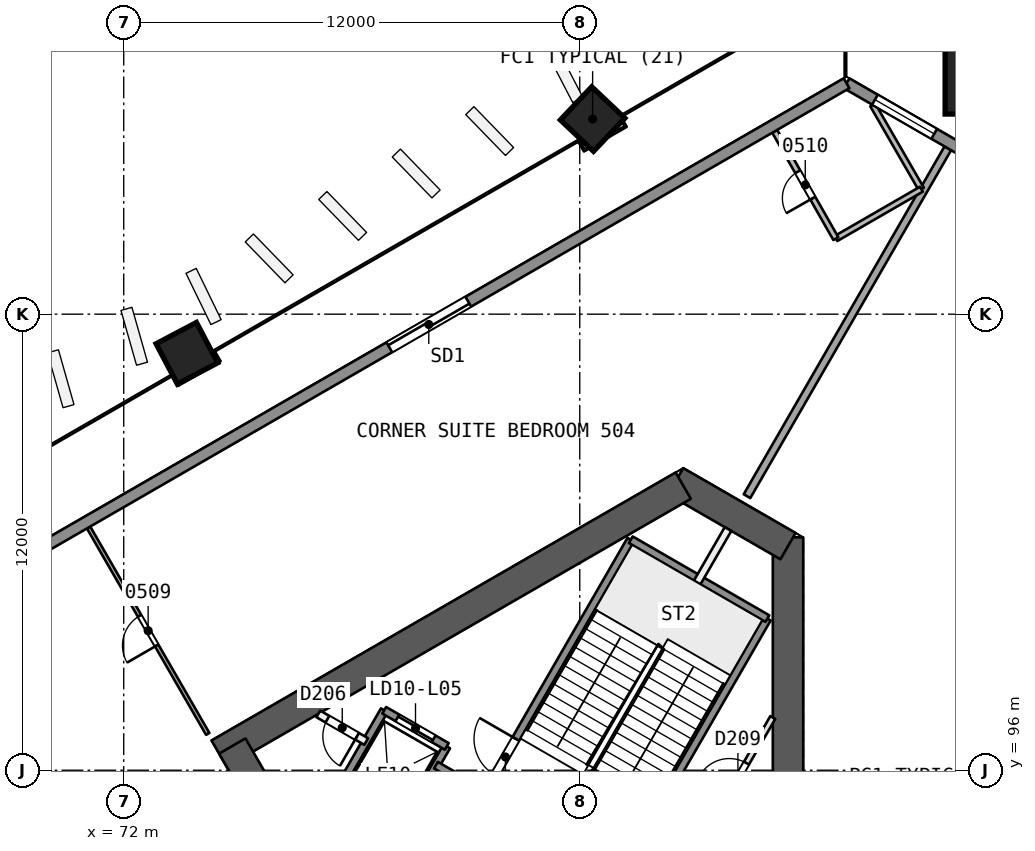
"""IFC4 building model, lengths in metres.
Left out: names, types, materials, properties, quantities, classifications, styles, units other than length and angle.
Written with IfcOpenShell. Run it as: python <this file> out.ifc"""

import sys

from ifc_helpers import new_model, si_unit, direction, frame, frame_2d, origin, origin_2d, place, context, subcontext, project, spatial, rectangle, extrude, element, fill, save


model = new_model("IFC4")
c1 = context("Model", 3, precision=1e-05, world=origin(), true_north=direction((0.0, 1.0)))
c2 = subcontext(c1, "Body", "Model", "MODEL_VIEW")
j1 = project(units=[si_unit("LENGTHUNIT", "METRE"), si_unit("PLANEANGLEUNIT", "RADIAN")], contexts=[c1])
p1 = place(None, origin())
s1 = spatial("IfcSite", under=j1, at=p1, CompositionType="ELEMENT")
p2 = place(p1, origin())
s2 = spatial("IfcBuilding", under=s1, at=p2, CompositionType="ELEMENT")
p3 = place(p2, frame((0.0, 0.0, 30.0)))
s3 = spatial("IfcBuildingStorey", under=s2, at=p3, CompositionType="ELEMENT", Elevation=30.0)
p4 = place(p3, frame((89.48, 88.194, 0.0), z_axis=(0.0, 0.0, 1.0), x_axis=(0.0, 1.0, 0.0)))
e1 = element("IfcWall", 1, at=p4, inside=s3, PredefinedType="SHEAR", context=c2, shape_type="SweptSolid", body=[
    extrude(rectangle(XDim=13.933, YDim=0.8, at=frame_2d((6.967, 0.0))), origin(), (0.0, 0.0, 1.0), 3.7),
])
p5 = place(p3, frame((89.48, 101.897, 0.0), z_axis=(0.0, 0.0, 1.0), x_axis=(-0.866034355626, 0.499984494636, 0.0)))
e2 = element("IfcWall", 2, at=p5, inside=s3, PredefinedType="SHEAR", context=c2, shape_type="SweptSolid", body=[
    extrude(rectangle(XDim=3.414, YDim=0.8, at=frame_2d((1.707, 0.0))), origin(), (0.0, 0.0, 1.0), 3.7),
])
p6 = place(p3, frame((86.723, 103.488, 0.0), z_axis=(0.0, 0.0, 1.0), x_axis=(-0.866032504327, -0.499987701298, 0.0)))
e3 = element("IfcWall", 3, at=p6, inside=s3, PredefinedType="SHEAR", context=c2, shape_type="SweptSolid", body=[
    extrude(rectangle(XDim=14.102, YDim=0.8, at=frame_2d((7.051, 0.0))), origin(), (0.0, 0.0, 1.0), 3.7),
])
p7 = place(p3, frame((74.856, 96.637, 0.0), z_axis=(0.0, 0.0, 1.0), x_axis=(0.499993500917, -0.866029155999, 0.0)))
e4 = element("IfcWall", 4, at=p7, inside=s3, PredefinedType="SHEAR", context=c2, shape_type="SweptSolid", body=[
    extrude(rectangle(XDim=9.98, YDim=0.8, at=frame_2d((4.99, 0.0))), origin(), (0.0, 0.0, 1.0), 3.7),
])
p8 = place(p7, frame((7.83, 0.0, 0.0)))
e5 = element("IfcOpeningElement", 5, at=p8, cuts=e4, PredefinedType="OPENING", context=c2, shape_type="SweptSolid", body=[
    extrude(rectangle(XDim=1.2, YDim=2.1, at=frame_2d((0.6, 1.05))), frame((0.0, 0.411, 0.0), z_axis=(0.0, -1.0, 0.0), x_axis=(1.0, 0.0, 0.0)), (0.0, 0.0, 1.0), 0.821),
])
p9 = place(p3, frame((95.035, 114.702, 0.0), z_axis=(-0.017607037296, -0.030466109479, 0.999380712447), x_axis=(0.500064653071, 0.865272876704, 0.035187946645)))
e6 = element("IfcColumn", 6, at=p9, inside=s3, PredefinedType="COLUMN", context=c2, shape_type="SweptSolid", body=[
    extrude(rectangle(XDim=2.8, YDim=2.8, at=origin_2d()), origin(), (0.0, 0.0, 1.0), 3.702),
])
p10 = place(p3, frame((84.349, 113.168, 0.0), z_axis=(-0.008376454378, -0.028163354484, 0.999568237028), x_axis=(0.865850871468, 0.499846877556, 0.02133933866)))
e7 = element("IfcColumn", 7, at=p10, inside=s3, PredefinedType="COLUMN", context=c2, shape_type="SweptSolid", body=[
    extrude(rectangle(XDim=1.2, YDim=1.2, at=origin_2d()), origin(), (0.0, 0.0, 1.0), 3.702),
])
p11 = place(p3, frame((73.662, 106.998, 0.0), z_axis=(0.000857578916, -0.022824792675, 0.999739112668), x_axis=(0.866060219769, 0.499825848733, 0.01066848966)))
e8 = element("IfcColumn", 8, at=p11, inside=s3, PredefinedType="COLUMN", context=c2, shape_type="SweptSolid", body=[
    extrude(rectangle(XDim=1.2, YDim=1.2, at=origin_2d()), origin(), (0.0, 0.0, 1.0), 3.701),
])
p12 = place(p3, frame((93.686, 112.365, 0.0), z_axis=(0.0, 0.0, 1.0), x_axis=(-0.499997037832, -0.866027113986, 0.0)))
e9 = element("IfcWall", 9, at=p12, inside=s3, PredefinedType="PARTITIONING", context=c2, shape_type="SweptSolid", body=[
    extrude(rectangle(XDim=10.57, YDim=0.2, at=frame_2d((5.285, 0.0))), origin(), (0.0, 0.0, 1.0), 3.2),
])
p13 = place(p3, frame((74.21, 96.956, 0.0), z_axis=(0.0, 0.0, 1.0), x_axis=(-0.499986391729, 0.866033260381, 0.0)))
e10 = element("IfcWall", 10, at=p13, inside=s3, PredefinedType="PARTITIONING", context=c2, shape_type="SweptSolid", body=[
    extrude(rectangle(XDim=6.272, YDim=0.1, at=frame_2d((3.136, 0.0))), origin(), (0.0, 0.0, 1.0), 3.2),
])
p14 = place(p13, frame((2.686, 0.0, 0.0)))
e11 = element("IfcOpeningElement", 11, at=p14, cuts=e10, PredefinedType="OPENING", context=c2, shape_type="SweptSolid", body=[
    extrude(rectangle(XDim=0.9, YDim=2.1, at=frame_2d((0.45, 1.05))), frame((0.0, 0.061, 0.0), z_axis=(0.0, -1.0, 0.0), x_axis=(1.0, 0.0, 0.0)), (0.0, 0.0, 1.0), 0.121),
])
p15 = place(p3, frame((66.754, 99.894, 0.0), z_axis=(0.0, 0.0, 1.0), x_axis=(0.499997291418, -0.866026967579, 0.0)))
e12 = element("IfcWall", 12, at=p15, inside=s3, PredefinedType="PARTITIONING", context=c2, shape_type="SweptSolid", body=[
    extrude(rectangle(XDim=14.251, YDim=0.2, at=frame_2d((7.125, 0.0))), origin(), (0.0, 0.0, 1.0), 3.2),
])
p16 = place(p3, frame((91.709, 113.506, 0.0), z_axis=(0.0, 0.0, 1.0), x_axis=(0.500025035936, -0.866010948798, 0.0)))
e13 = element("IfcWall", 13, at=p16, inside=s3, PredefinedType="PARTITIONING", context=c2, shape_type="SweptSolid", body=[
    extrude(rectangle(XDim=2.561, YDim=0.15, at=frame_2d((1.28, 0.0))), origin(), (0.0, 0.0, 1.0), 3.2),
])
p17 = place(p3, frame((92.99, 111.288, 0.0), z_axis=(0.0, 0.0, 1.0), x_axis=(-0.866021400173, -0.500006934395, 0.0)))
e14 = element("IfcWall", 14, at=p17, inside=s3, PredefinedType="PARTITIONING", context=c2, shape_type="SweptSolid", body=[
    extrude(rectangle(XDim=2.6, YDim=0.15, at=frame_2d((1.3, 0.0))), origin(), (0.0, 0.0, 1.0), 3.2),
])
p18 = place(p3, frame((90.738, 109.988, 0.0), z_axis=(0.0, 0.0, 1.0), x_axis=(-0.494941047154, 0.868926556069, 0.0)))
e15 = element("IfcWall", 15, at=p18, inside=s3, PredefinedType="PARTITIONING", context=c2, shape_type="SweptSolid", body=[
    extrude(rectangle(XDim=3.25, YDim=0.15, at=frame_2d((1.625, 0.0))), origin(), (0.0, 0.0, 1.0), 3.2),
])
p19 = place(p18, frame((1.225, 0.0, 0.0)))
e16 = element("IfcOpeningElement", 16, at=p19, cuts=e15, PredefinedType="OPENING", context=c2, shape_type="SweptSolid", body=[
    extrude(rectangle(XDim=0.8, YDim=2.1, at=frame_2d((0.4, 1.05))), frame((0.0, 0.085, 0.0), z_axis=(0.0, -1.0, 0.0), x_axis=(1.0, 0.0, 0.0)), (0.0, 0.0, 1.0), 0.171),
])
p20 = place(p3, frame((91.021, 114.076, 0.0), z_axis=(0.0, 0.0, 1.0), x_axis=(0.866033291922, -0.499986337096, 0.0)))
e17 = element("IfcWall", 17, at=p20, inside=s3, PredefinedType="SOLIDWALL", context=c2, shape_type="SweptSolid", body=[
    extrude(rectangle(XDim=6.327, YDim=0.3, at=frame_2d((3.164, 0.0))), origin(), (0.0, 0.0, 1.0), 3.2),
])
p21 = place(p20, frame((0.863, 0.0, 0.9)))
e18 = element("IfcOpeningElement", 18, at=p21, cuts=e17, PredefinedType="OPENING", context=c2, shape_type="SweptSolid", body=[
    extrude(rectangle(XDim=1.8, YDim=1.5, at=frame_2d((0.9, 0.75))), frame((0.0, 0.161, 0.0), z_axis=(0.0, -1.0, 0.0), x_axis=(1.0, 0.0, 0.0)), (0.0, 0.0, 1.0), 0.321),
])
p22 = place(p20, frame((3.888, 0.0, 0.9)))
e19 = element("IfcOpeningElement", 19, at=p22, cuts=e17, PredefinedType="OPENING", context=c2, shape_type="SweptSolid", body=[
    extrude(rectangle(XDim=1.8, YDim=1.5, at=frame_2d((0.9, 0.75))), frame((0.0, 0.161, 0.0), z_axis=(0.0, -1.0, 0.0), x_axis=(1.0, 0.0, 0.0)), (0.0, 0.0, 1.0), 0.321),
])
p23 = place(p3, frame((37.479, 83.163, 0.0), z_axis=(0.0, 0.0, 1.0), x_axis=(0.866024340432, 0.500001841776, 0.0)))
e20 = element("IfcWall", 20, at=p23, inside=s3, PredefinedType="SOLIDWALL", context=c2, shape_type="SweptSolid", body=[
    extrude(rectangle(XDim=61.824, YDim=0.3, at=frame_2d((30.912, 0.0))), origin(), (0.0, 0.0, 1.0), 3.2),
])
p24 = place(p23, frame((29.556, 0.0, 0.0)))
e21 = element("IfcOpeningElement", 21, at=p24, cuts=e20, PredefinedType="OPENING", context=c2, shape_type="SweptSolid", body=[
    extrude(rectangle(XDim=2.4, YDim=2.4, at=frame_2d((1.2, 1.2))), frame((0.0, 0.161, 0.0), z_axis=(0.0, -1.0, 0.0), x_axis=(1.0, 0.0, 0.0)), (0.0, 0.0, 1.0), 0.321),
])
p25 = place(p23, frame((35.012, 0.0, 0.0)))
e22 = element("IfcOpeningElement", 22, at=p25, cuts=e20, PredefinedType="OPENING", context=c2, shape_type="SweptSolid", body=[
    extrude(rectangle(XDim=2.4, YDim=2.4, at=frame_2d((1.2, 1.2))), frame((0.0, 0.161, 0.0), z_axis=(0.0, -1.0, 0.0), x_axis=(1.0, 0.0, 0.0)), (0.0, 0.0, 1.0), 0.321),
])
p26 = place(p23, frame((47.93, 0.0, 0.0)))
e23 = element("IfcOpeningElement", 23, at=p26, cuts=e20, PredefinedType="OPENING", context=c2, shape_type="SweptSolid", body=[
    extrude(rectangle(XDim=2.4, YDim=2.4, at=frame_2d((1.2, 1.2))), frame((0.0, 0.161, 0.0), z_axis=(0.0, -1.0, 0.0), x_axis=(1.0, 0.0, 0.0)), (0.0, 0.0, 1.0), 0.321),
])
p27 = place(p23, frame((24.256, 0.0, 0.0)))
e24 = element("IfcOpeningElement", 24, at=p27, cuts=e20, PredefinedType="OPENING", context=c2, shape_type="SweptSolid", body=[
    extrude(rectangle(XDim=2.4, YDim=2.4, at=frame_2d((1.2, 1.2))), frame((0.0, 0.161, 0.0), z_axis=(0.0, -1.0, 0.0), x_axis=(1.0, 0.0, 0.0)), (0.0, 0.0, 1.0), 0.321),
])
p28 = place(p23, frame((11.509, 0.0, 0.0)))
e25 = element("IfcOpeningElement", 25, at=p28, cuts=e20, PredefinedType="OPENING", context=c2, shape_type="SweptSolid", body=[
    extrude(rectangle(XDim=2.4, YDim=2.4, at=frame_2d((1.2, 1.2))), frame((0.0, 0.161, 0.0), z_axis=(0.0, -1.0, 0.0), x_axis=(1.0, 0.0, 0.0)), (0.0, 0.0, 1.0), 0.321),
])
p29 = place(p3, frame((87.271, 94.254, 0.0), z_axis=(0.0, 0.0, 1.0), x_axis=(0.500043727655, 0.866000156139, 0.0)))
e26 = element("IfcWall", 26, at=p29, inside=s3, PredefinedType="PARTITIONING", context=c2, shape_type="SweptSolid", body=[
    extrude(rectangle(XDim=3.618, YDim=0.15, at=frame_2d((1.809, 0.0))), origin(), (0.0, 0.0, 1.0), 3.2),
])
p30 = place(p29, frame((1.332, 0.0, 0.0)))
e27 = element("IfcOpeningElement", 27, at=p30, cuts=e26, PredefinedType="OPENING", context=c2, shape_type="SweptSolid", body=[
    extrude(rectangle(XDim=0.9, YDim=2.1, at=frame_2d((0.45, 1.05))), frame((0.0, 0.085, 0.0), z_axis=(0.0, -1.0, 0.0), x_axis=(1.0, 0.0, 0.0)), (0.0, 0.0, 1.0), 0.171),
])
p31 = place(p3, frame((85.087, 93.321, 0.0), z_axis=(0.0, 0.0, 1.0), x_axis=(0.500019787375, 0.866013979237, 0.0)))
e28 = element("IfcWall", 28, at=p31, inside=s3, PredefinedType="SOLIDWALL", context=c2, shape_type="SweptSolid", body=[
    extrude(rectangle(XDim=7.7, YDim=0.2, at=frame_2d((3.85, 0.0))), origin(), (0.0, 0.0, 1.0), 3.2),
])
p32 = place(p3, frame((87.09, 100.94, 0.0), z_axis=(0.0, 0.0, 1.0), x_axis=(0.499956811548, 0.866050337213, 0.0)))
e29 = element("IfcWall", 29, at=p32, inside=s3, PredefinedType="PARTITIONING", context=c2, shape_type="SweptSolid", body=[
    extrude(rectangle(XDim=1.623, YDim=0.2, at=frame_2d((0.812, 0.0))), origin(), (0.0, 0.0, 1.0), 3.2),
])
p33 = place(p3, frame((81.493, 95.396, 0.0), z_axis=(0.0, 0.0, 1.0), x_axis=(0.500006057782, 0.866021906294, 0.0)))
e30 = element("IfcWall", 30, at=p33, inside=s3, PredefinedType="SOLIDWALL", context=c2, shape_type="SweptSolid", body=[
    extrude(rectangle(XDim=7.7, YDim=0.2, at=frame_2d((3.85, 0.0))), origin(), (0.0, 0.0, 1.0), 3.2),
])
p34 = place(p33, frame((0.55, 0.0, 0.0)))
e31 = element("IfcOpeningElement", 31, at=p34, cuts=e30, PredefinedType="OPENING", context=c2, shape_type="SweptSolid", body=[
    extrude(rectangle(XDim=1.1, YDim=2.1, at=frame_2d((0.55, 1.05))), frame((0.0, 0.11, 0.0), z_axis=(0.0, -1.0, 0.0), x_axis=(1.0, 0.0, 0.0)), (0.0, 0.0, 1.0), 0.221),
])
for number, where, z_axis, x_axis in (
    (32, (78.976, 93.986, 0.0), (0.0, 0.0, 1.0), (0.5, 0.866, 0.0)),
    (33, (77.33, 94.936, 0.0), (0.0, 0.0, 1.0), (0.5, 0.866, 0.0)),
):
    element("IfcWall", number, at=place(p3, frame(where, z_axis=z_axis, x_axis=x_axis)), inside=s3, PredefinedType="SOLIDWALL", context=c2, shape_type="SweptSolid", body=[
        extrude(rectangle(XDim=3.05, YDim=0.2, at=frame_2d((1.525, 0.0))), origin(), (0.0, 0.0, 1.0), 3.2),
    ])
p35 = place(p3, frame((78.38, 96.755, 0.0), z_axis=(0.0, 0.0, 1.0), x_axis=(-0.866003949776, 0.500037157592, 0.0)))
e34 = element("IfcWall", 34, at=p35, inside=s3, PredefinedType="PARTITIONING", context=c2, shape_type="SweptSolid", body=[
    extrude(rectangle(XDim=1.455, YDim=0.2, at=frame_2d((0.728, 0.0))), origin(), (0.0, 0.0, 1.0), 3.2),
])
p36 = place(p35, frame((0.278, 0.0, 0.0)))
e35 = element("IfcOpeningElement", 35, at=p36, cuts=e34, PredefinedType="OPENING", context=c2, shape_type="SweptSolid", body=[
    extrude(rectangle(XDim=0.9, YDim=2.1, at=frame_2d((0.45, 1.05))), frame((0.0, 0.11, 0.0), z_axis=(0.0, -1.0, 0.0), x_axis=(1.0, 0.0, 0.0)), (0.0, 0.0, 1.0), 0.221),
])
p37 = place(p3, frame((88.01, 91.634, 0.0), z_axis=(0.0, 0.0, 1.0), x_axis=(-0.866024315419, 0.5000018851, 0.0)))
e36 = element("IfcWall", 36, at=p37, inside=s3, PredefinedType="SOLIDWALL", context=c2, shape_type="SweptSolid", body=[
    extrude(rectangle(XDim=9.0, YDim=0.2, at=frame_2d((4.5, 0.0))), origin(), (0.0, 0.0, 1.0), 3.2),
])
p38 = place(p3, frame((80.5, 96.627, 0.0), z_axis=(0.0, 0.0, 1.0), x_axis=(-0.86601224135, 0.500022797313, 0.0)))
e37 = element("IfcWall", 37, at=p38, inside=s3, PredefinedType="SOLIDWALL", context=c2, shape_type="SweptSolid", body=[
    extrude(rectangle(XDim=1.9, YDim=0.2, at=frame_2d((0.95, 0.0))), origin(), (0.0, 0.0, 1.0), 3.2),
])
p39 = place(p38, frame((0.4, 0.0, 0.0)))
e38 = element("IfcOpeningElement", 38, at=p39, cuts=e37, PredefinedType="OPENING", context=c2, shape_type="SweptSolid", body=[
    extrude(rectangle(XDim=1.1, YDim=2.1, at=frame_2d((0.55, 1.05))), frame((0.0, 0.11, 0.0), z_axis=(0.0, -1.0, 0.0), x_axis=(1.0, 0.0, 0.0)), (0.0, 0.0, 1.0), 0.221),
])
p40 = place(p3, frame((88.937, 99.99, 0.0), z_axis=(0.0, 0.0, 1.0), x_axis=(-0.866004344652, 0.500036473714, 0.0)))
e39 = element("IfcWall", 39, at=p40, inside=s3, PredefinedType="SOLIDWALL", context=c2, shape_type="SweptSolid", body=[
    extrude(rectangle(XDim=4.15, YDim=0.2, at=frame_2d((2.075, 0.0))), origin(), (0.0, 0.0, 1.0), 3.2),
])
p41 = place(p14, origin())
e40 = element("IfcDoor", 40, at=p41, inside=s3, OperationType="SINGLE_SWING_LEFT", PredefinedType="NOTDEFINED", context=c2, shape_type="SweptSolid", body=[
    extrude(rectangle(XDim=0.9, YDim=2.1, at=frame_2d((0.45, 1.05))), frame((0.0, 0.025, 0.0), z_axis=(0.0, -1.0, 0.0), x_axis=(1.0, 0.0, 0.0)), (0.0, 0.0, 1.0), 0.05),
])
fill(e11, e40)
p42 = place(p19, origin())
e41 = element("IfcDoor", 41, at=p42, inside=s3, OperationType="SINGLE_SWING_LEFT", PredefinedType="NOTDEFINED", context=c2, shape_type="SweptSolid", body=[
    extrude(rectangle(XDim=0.8, YDim=2.1, at=frame_2d((0.4, 1.05))), frame((0.0, 0.025, 0.0), z_axis=(0.0, -1.0, 0.0), x_axis=(1.0, 0.0, 0.0)), (0.0, 0.0, 1.0), 0.05),
])
fill(e16, e41)
p43 = place(p21, origin())
e42 = element("IfcWindow", 42, at=p43, inside=s3, PartitioningType="SINGLE_PANEL", PredefinedType="WINDOW", context=c2, shape_type="SweptSolid", body=[
    extrude(rectangle(XDim=1.8, YDim=1.5, at=frame_2d((0.9, 0.75))), frame((0.0, 0.03, 0.0), z_axis=(0.0, -1.0, 0.0), x_axis=(1.0, 0.0, 0.0)), (0.0, 0.0, 1.0), 0.06),
])
fill(e18, e42)
p44 = place(p26, origin())
e43 = element("IfcDoor", 43, at=p44, inside=s3, OperationType="SLIDING_TO_LEFT", PredefinedType="NOTDEFINED", context=c2, shape_type="SweptSolid", body=[
    extrude(rectangle(XDim=2.4, YDim=2.4, at=frame_2d((1.2, 1.2))), frame((0.0, 0.025, 0.0), z_axis=(0.0, -1.0, 0.0), x_axis=(1.0, 0.0, 0.0)), (0.0, 0.0, 1.0), 0.05),
])
fill(e23, e43)
p45 = place(p39, origin())
e44 = element("IfcDoor", 44, at=p45, inside=s3, OperationType="SLIDING_TO_RIGHT", PredefinedType="NOTDEFINED", context=c2, shape_type="SweptSolid", body=[
    extrude(rectangle(XDim=1.1, YDim=2.1, at=frame_2d((0.55, 1.05))), frame((0.0, 0.025, 0.0), z_axis=(0.0, -1.0, 0.0), x_axis=(1.0, 0.0, 0.0)), (0.0, 0.0, 1.0), 0.05),
])
fill(e38, e44)
p46 = place(p36, origin())
e45 = element("IfcDoor", 45, at=p46, inside=s3, OperationType="SINGLE_SWING_LEFT", PredefinedType="NOTDEFINED", context=c2, shape_type="SweptSolid", body=[
    extrude(rectangle(XDim=0.9, YDim=2.1, at=frame_2d((0.45, 1.05))), frame((0.0, 0.025, 0.0), z_axis=(0.0, -1.0, 0.0), x_axis=(1.0, 0.0, 0.0)), (0.0, 0.0, 1.0), 0.05),
])
fill(e35, e45)
p47 = place(p34, origin())
e46 = element("IfcDoor", 46, at=p47, inside=s3, OperationType="SINGLE_SWING_RIGHT", PredefinedType="NOTDEFINED", context=c2, shape_type="SweptSolid", body=[
    extrude(rectangle(XDim=1.1, YDim=2.1, at=frame_2d((0.55, 1.05))), frame((0.0, 0.025, 0.0), z_axis=(0.0, -1.0, 0.0), x_axis=(1.0, 0.0, 0.0)), (0.0, 0.0, 1.0), 0.05),
])
fill(e31, e46)
p48 = place(p30, origin())
e47 = element("IfcDoor", 47, at=p48, inside=s3, OperationType="SINGLE_SWING_LEFT", PredefinedType="NOTDEFINED", context=c2, shape_type="SweptSolid", body=[
    extrude(rectangle(XDim=0.9, YDim=2.1, at=frame_2d((0.45, 1.05))), frame((0.0, 0.025, 0.0), z_axis=(0.0, -1.0, 0.0), x_axis=(1.0, 0.0, 0.0)), (0.0, 0.0, 1.0), 0.05),
])
fill(e27, e47)
save(model, sys.argv[1])
